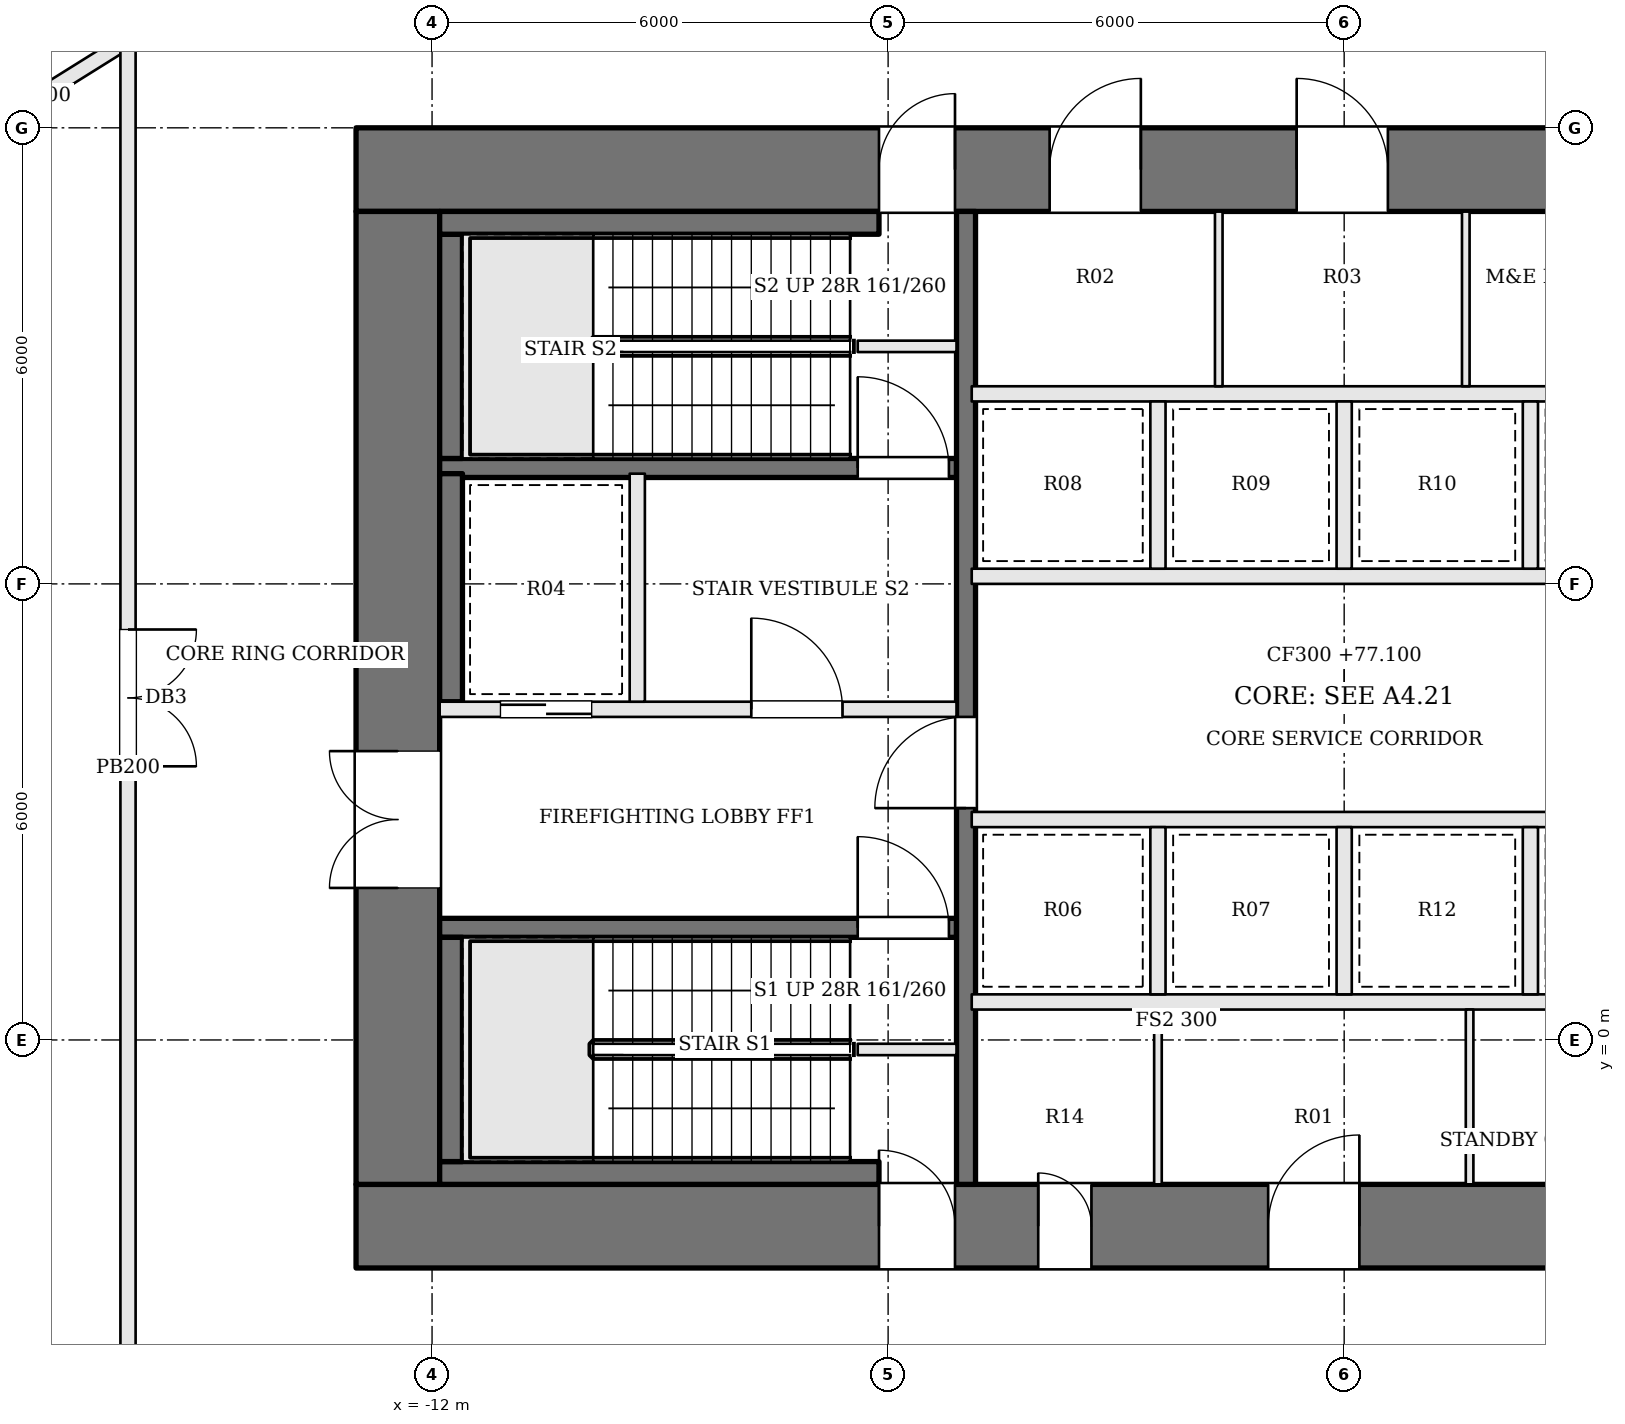
"""IFC4 building model, lengths in metres.
Left out: names, types, materials, properties, quantities, classifications, styles, units other than length and angle.
Written with IfcOpenShell. Run it as: python <this file> out.ifc"""

import sys

from ifc_helpers import new_model, si_unit, direction, frame, frame_2d, origin, place, context, subcontext, project, spatial, rectangle, extrude, element, fill, save


model = new_model("IFC4")
c1 = context("Model", 3, precision=1e-05, world=origin(), true_north=direction((0.0, 1.0)))
c2 = subcontext(c1, "Body", "Model", "MODEL_VIEW")
j1 = project(units=[si_unit("LENGTHUNIT", "METRE"), si_unit("PLANEANGLEUNIT", "RADIAN")], contexts=[c1])
p1 = place(None, origin())
s1 = spatial("IfcSite", under=j1, at=p1, CompositionType="ELEMENT")
p2 = place(p1, origin())
s2 = spatial("IfcBuilding", under=s1, at=p2, CompositionType="ELEMENT")
p3 = place(p2, frame((0.0, 0.0, 77.1)))
s3 = spatial("IfcBuildingStorey", under=s2, at=p3, CompositionType="ELEMENT", Elevation=77.1)
p4 = place(p3, frame((-13.0, 11.45, 0.0), z_axis=(0.0, 0.0, 1.0), x_axis=(1.0, 0.0, 0.0)))
e1 = element("IfcWall", 1, at=p4, inside=s3, PredefinedType="SHEAR", context=c2, shape_type="SweptSolid", body=[
    extrude(rectangle(XDim=26.0, YDim=1.1, at=frame_2d((13.0, 0.0))), origin(), (0.0, 0.0, 1.0), 4.5),
])
p5 = place(p4, frame((9.125, 0.0, 0.0)))
e2 = element("IfcOpeningElement", 2, at=p5, cuts=e1, PredefinedType="OPENING", context=c2, shape_type="SweptSolid", body=[
    extrude(rectangle(XDim=1.2, YDim=2.1, at=frame_2d((0.6, 1.05))), frame((0.0, 0.56, 0.0), z_axis=(0.0, -1.0, 0.0), x_axis=(1.0, 0.0, 0.0)), (0.0, 0.0, 1.0), 1.12),
])
p6 = place(p4, frame((12.375, 0.0, 0.0)))
e3 = element("IfcOpeningElement", 3, at=p6, cuts=e1, PredefinedType="OPENING", context=c2, shape_type="SweptSolid", body=[
    extrude(rectangle(XDim=1.2, YDim=2.1, at=frame_2d((0.6, 1.05))), frame((0.0, 0.56, 0.0), z_axis=(0.0, -1.0, 0.0), x_axis=(1.0, 0.0, 0.0)), (0.0, 0.0, 1.0), 1.12),
])
p7 = place(p4, frame((15.9, 0.0, 0.0)))
e4 = element("IfcOpeningElement", 4, at=p7, cuts=e1, PredefinedType="OPENING", context=c2, shape_type="SweptSolid", body=[
    extrude(rectangle(XDim=0.7, YDim=2.1, at=frame_2d((0.35, 1.05))), frame((0.0, 0.56, 0.0), z_axis=(0.0, -1.0, 0.0), x_axis=(1.0, 0.0, 0.0)), (0.0, 0.0, 1.0), 1.12),
])
p8 = place(p4, frame((6.88, 0.0, 0.0)))
e5 = element("IfcOpeningElement", 5, at=p8, cuts=e1, PredefinedType="OPENING", context=c2, shape_type="SweptSolid", body=[
    extrude(rectangle(XDim=1.0, YDim=2.1, at=frame_2d((0.5, 1.05))), frame((0.0, 0.56, 0.0), z_axis=(0.0, -1.0, 0.0), x_axis=(1.0, 0.0, 0.0)), (0.0, 0.0, 1.0), 1.12),
])
p9 = place(p4, frame((18.12, 0.0, 0.0)))
e6 = element("IfcOpeningElement", 6, at=p9, cuts=e1, PredefinedType="OPENING", context=c2, shape_type="SweptSolid", body=[
    extrude(rectangle(XDim=1.0, YDim=2.1, at=frame_2d((0.5, 1.05))), frame((0.0, 0.56, 0.0), z_axis=(0.0, -1.0, 0.0), x_axis=(1.0, 0.0, 0.0)), (0.0, 0.0, 1.0), 1.12),
])
p10 = place(p3, frame((-13.0, -2.45, 0.0), z_axis=(0.0, 0.0, 1.0), x_axis=(1.0, 0.0, 0.0)))
e7 = element("IfcWall", 7, at=p10, inside=s3, PredefinedType="SHEAR", context=c2, shape_type="SweptSolid", body=[
    extrude(rectangle(XDim=26.0, YDim=1.1, at=frame_2d((13.0, 0.0))), origin(), (0.0, 0.0, 1.0), 4.5),
])
p11 = place(p10, frame((8.975, 0.0, 0.0)))
e8 = element("IfcOpeningElement", 8, at=p11, cuts=e7, PredefinedType="OPENING", context=c2, shape_type="SweptSolid", body=[
    extrude(rectangle(XDim=0.7, YDim=2.1, at=frame_2d((0.35, 1.05))), frame((0.0, 0.56, 0.0), z_axis=(0.0, -1.0, 0.0), x_axis=(1.0, 0.0, 0.0)), (0.0, 0.0, 1.0), 1.12),
])
p12 = place(p10, frame((12.0, 0.0, 0.0)))
e9 = element("IfcOpeningElement", 9, at=p12, cuts=e7, PredefinedType="OPENING", context=c2, shape_type="SweptSolid", body=[
    extrude(rectangle(XDim=1.2, YDim=2.1, at=frame_2d((0.6, 1.05))), frame((0.0, 0.56, 0.0), z_axis=(0.0, -1.0, 0.0), x_axis=(1.0, 0.0, 0.0)), (0.0, 0.0, 1.0), 1.12),
])
p13 = place(p10, frame((15.675, 0.0, 0.0)))
e10 = element("IfcOpeningElement", 10, at=p13, cuts=e7, PredefinedType="OPENING", context=c2, shape_type="SweptSolid", body=[
    extrude(rectangle(XDim=1.2, YDim=2.1, at=frame_2d((0.6, 1.05))), frame((0.0, 0.56, 0.0), z_axis=(0.0, -1.0, 0.0), x_axis=(1.0, 0.0, 0.0)), (0.0, 0.0, 1.0), 1.12),
])
p14 = place(p10, frame((6.88, 0.0, 0.0)))
e11 = element("IfcOpeningElement", 11, at=p14, cuts=e7, PredefinedType="OPENING", context=c2, shape_type="SweptSolid", body=[
    extrude(rectangle(XDim=1.0, YDim=2.1, at=frame_2d((0.5, 1.05))), frame((0.0, 0.56, 0.0), z_axis=(0.0, -1.0, 0.0), x_axis=(1.0, 0.0, 0.0)), (0.0, 0.0, 1.0), 1.12),
])
p15 = place(p10, frame((18.12, 0.0, 0.0)))
e12 = element("IfcOpeningElement", 12, at=p15, cuts=e7, PredefinedType="OPENING", context=c2, shape_type="SweptSolid", body=[
    extrude(rectangle(XDim=1.0, YDim=2.1, at=frame_2d((0.5, 1.05))), frame((0.0, 0.56, 0.0), z_axis=(0.0, -1.0, 0.0), x_axis=(1.0, 0.0, 0.0)), (0.0, 0.0, 1.0), 1.12),
])
p16 = place(p3, frame((-12.45, -1.9, 0.0), z_axis=(0.0, 0.0, 1.0), x_axis=(0.0, 1.0, 0.0)))
e13 = element("IfcWall", 13, at=p16, inside=s3, PredefinedType="SHEAR", context=c2, shape_type="SweptSolid", body=[
    extrude(rectangle(XDim=12.8, YDim=1.1, at=frame_2d((6.4, 0.0))), origin(), (0.0, 0.0, 1.0), 4.5),
])
p17 = place(p16, frame((3.9, 0.0, 0.0)))
e14 = element("IfcOpeningElement", 14, at=p17, cuts=e13, PredefinedType="OPENING", context=c2, shape_type="SweptSolid", body=[
    extrude(rectangle(XDim=1.8, YDim=2.1, at=frame_2d((0.9, 1.05))), frame((0.0, 0.56, 0.0), z_axis=(0.0, -1.0, 0.0), x_axis=(1.0, 0.0, 0.0)), (0.0, 0.0, 1.0), 1.12),
])
for number, where, z_axis, x_axis in (
    (15, (-6.4, -0.125, 0.0), (0.0, 0.0, 1.0), (1.0, 0.0, 0.0)),
    (16, (-6.4, 9.125, 0.0), (0.0, 0.0, 1.0), (1.0, 0.0, 0.0)),
):
    element("IfcWall", number, at=place(p3, frame(where, z_axis=z_axis, x_axis=x_axis)), inside=s3, PredefinedType="SOLIDWALL", context=c2, shape_type="SweptSolid", body=[
        extrude(rectangle(XDim=1.3, YDim=0.15, at=frame_2d((0.65, 0.0))), origin(), (0.0, 0.0, 1.0), 4.3),
    ])
p18 = place(p3, frame((-11.9, 1.475, 0.0), z_axis=(0.0, 0.0, 1.0), x_axis=(1.0, 0.0, 0.0)))
e17 = element("IfcWall", 17, at=p18, inside=s3, PredefinedType="SOLIDWALL", context=c2, shape_type="SweptSolid", body=[
    extrude(rectangle(XDim=6.8, YDim=0.25, at=frame_2d((3.4, 0.0))), origin(), (0.0, 0.0, 1.0), 4.3),
])
p19 = place(p18, frame((5.5, 0.0, 0.0)))
e18 = element("IfcOpeningElement", 18, at=p19, cuts=e17, PredefinedType="OPENING", context=c2, shape_type="SweptSolid", body=[
    extrude(rectangle(XDim=1.2, YDim=2.1, at=frame_2d((0.6, 1.05))), frame((0.0, 0.135, 0.0), z_axis=(0.0, -1.0, 0.0), x_axis=(1.0, 0.0, 0.0)), (0.0, 0.0, 1.0), 0.27),
])
p20 = place(p3, frame((-11.9, 4.35, 0.0), z_axis=(0.0, 0.0, 1.0), x_axis=(1.0, 0.0, 0.0)))
e19 = element("IfcWall", 19, at=p20, inside=s3, PredefinedType="SOLIDWALL", context=c2, shape_type="SweptSolid", body=[
    extrude(rectangle(XDim=6.8, YDim=0.2, at=frame_2d((3.4, 0.0))), origin(), (0.0, 0.0, 1.0), 4.3),
])
p21 = place(p20, frame((4.1, 0.0, 0.0)))
e20 = element("IfcOpeningElement", 20, at=p21, cuts=e19, PredefinedType="OPENING", context=c2, shape_type="SweptSolid", body=[
    extrude(rectangle(XDim=1.2, YDim=2.1, at=frame_2d((0.6, 1.05))), frame((0.0, 0.11, 0.0), z_axis=(0.0, -1.0, 0.0), x_axis=(1.0, 0.0, 0.0)), (0.0, 0.0, 1.0), 0.22),
])
p22 = place(p20, frame((0.8, 0.0, 0.0)))
e21 = element("IfcOpeningElement", 21, at=p22, cuts=e19, PredefinedType="OPENING", context=c2, shape_type="SweptSolid", body=[
    extrude(rectangle(XDim=1.2, YDim=2.1, at=frame_2d((0.6, 1.05))), frame((0.0, 0.11, 0.0), z_axis=(0.0, -1.0, 0.0), x_axis=(1.0, 0.0, 0.0)), (0.0, 0.0, 1.0), 0.22),
])
p23 = place(p3, frame((-11.9, 7.525, 0.0), z_axis=(0.0, 0.0, 1.0), x_axis=(1.0, 0.0, 0.0)))
e22 = element("IfcWall", 22, at=p23, inside=s3, PredefinedType="SOLIDWALL", context=c2, shape_type="SweptSolid", body=[
    extrude(rectangle(XDim=6.8, YDim=0.25, at=frame_2d((3.4, 0.0))), origin(), (0.0, 0.0, 1.0), 4.3),
])
p24 = place(p23, frame((5.5, 0.0, 0.0)))
e23 = element("IfcOpeningElement", 23, at=p24, cuts=e22, PredefinedType="OPENING", context=c2, shape_type="SweptSolid", body=[
    extrude(rectangle(XDim=1.2, YDim=2.1, at=frame_2d((0.6, 1.05))), frame((0.0, 0.135, 0.0), z_axis=(0.0, -1.0, 0.0), x_axis=(1.0, 0.0, 0.0)), (0.0, 0.0, 1.0), 0.27),
])
p25 = place(p3, frame((-9.3, 4.45, 0.0), z_axis=(0.0, 0.0, 1.0), x_axis=(0.0, 1.0, 0.0)))
e24 = element("IfcWall", 24, at=p25, inside=s3, PredefinedType="SOLIDWALL", context=c2, shape_type="SweptSolid", body=[
    extrude(rectangle(XDim=3.0, YDim=0.2, at=frame_2d((1.5, 0.0))), origin(), (0.0, 0.0, 1.0), 4.3),
])
p26 = place(p3, frame((-4.975, -1.9, 0.0), z_axis=(0.0, 0.0, 1.0), x_axis=(0.0, 1.0, 0.0)))
e25 = element("IfcWall", 25, at=p26, inside=s3, PredefinedType="SOLIDWALL", context=c2, shape_type="SweptSolid", body=[
    extrude(rectangle(XDim=12.8, YDim=0.25, at=frame_2d((6.4, 0.0))), origin(), (0.0, 0.0, 1.0), 4.3),
])
p27 = place(p26, frame((4.95, 0.0, 0.0)))
e26 = element("IfcOpeningElement", 26, at=p27, cuts=e25, PredefinedType="OPENING", context=c2, shape_type="SweptSolid", body=[
    extrude(rectangle(XDim=1.2, YDim=2.1, at=frame_2d((0.6, 1.05))), frame((0.0, 0.135, 0.0), z_axis=(0.0, -1.0, 0.0), x_axis=(1.0, 0.0, 0.0)), (0.0, 0.0, 1.0), 0.27),
])
p28 = place(p3, frame((-11.9, -1.75, 0.0), z_axis=(0.0, 0.0, 1.0), x_axis=(1.0, 0.0, 0.0)))
e27 = element("IfcWall", 27, at=p28, inside=s3, PredefinedType="SOLIDWALL", context=c2, shape_type="SweptSolid", body=[
    extrude(rectangle(XDim=5.78, YDim=0.3, at=frame_2d((2.89, 0.0))), origin(), (0.0, 0.0, 1.0), 4.3),
])
p29 = place(p3, frame((-11.75, -1.6, 0.0), z_axis=(0.0, 0.0, 1.0), x_axis=(0.0, 1.0, 0.0)))
e28 = element("IfcWall", 28, at=p29, inside=s3, PredefinedType="SOLIDWALL", context=c2, shape_type="SweptSolid", body=[
    extrude(rectangle(XDim=2.95, YDim=0.3, at=frame_2d((1.475, 0.0))), origin(), (0.0, 0.0, 1.0), 4.3),
])
p30 = place(p3, frame((-11.75, 4.45, 0.0), z_axis=(0.0, 0.0, 1.0), x_axis=(0.0, 1.0, 0.0)))
e29 = element("IfcWall", 29, at=p30, inside=s3, PredefinedType="SOLIDWALL", context=c2, shape_type="SweptSolid", body=[
    extrude(rectangle(XDim=3.0, YDim=0.3, at=frame_2d((1.5, 0.0))), origin(), (0.0, 0.0, 1.0), 4.3),
])
p31 = place(p3, frame((-11.75, 7.65, 0.0), z_axis=(0.0, 0.0, 1.0), x_axis=(0.0, 1.0, 0.0)))
e30 = element("IfcWall", 30, at=p31, inside=s3, PredefinedType="SOLIDWALL", context=c2, shape_type="SweptSolid", body=[
    extrude(rectangle(XDim=2.95, YDim=0.3, at=frame_2d((1.475, 0.0))), origin(), (0.0, 0.0, 1.0), 4.3),
])
p32 = place(p3, frame((-11.9, 10.75, 0.0), z_axis=(0.0, 0.0, 1.0), x_axis=(1.0, 0.0, 0.0)))
e31 = element("IfcWall", 31, at=p32, inside=s3, PredefinedType="SOLIDWALL", context=c2, shape_type="SweptSolid", body=[
    extrude(rectangle(XDim=5.78, YDim=0.3, at=frame_2d((2.89, 0.0))), origin(), (0.0, 0.0, 1.0), 4.3),
])
for number, where, z_axis, x_axis in (
    (32, (-4.9, 0.5, 0.0), (0.0, 0.0, 1.0), (1.0, 0.0, 0.0)),
    (33, (-4.9, 2.9, 0.0), (0.0, 0.0, 1.0), (1.0, 0.0, 0.0)),
    (34, (-4.9, 6.1, 0.0), (0.0, 0.0, 1.0), (1.0, 0.0, 0.0)),
    (35, (-4.9, 8.5, 0.0), (0.0, 0.0, 1.0), (1.0, 0.0, 0.0)),
):
    element("IfcWall", number, at=place(p3, frame(where, z_axis=z_axis, x_axis=x_axis)), inside=s3, PredefinedType="SOLIDWALL", context=c2, shape_type="SweptSolid", body=[
        extrude(rectangle(XDim=9.8, YDim=0.2, at=frame_2d((4.9, 0.0))), origin(), (0.0, 0.0, 1.0), 4.3),
    ])
for number, where, z_axis, x_axis in (
    (36, (-2.45, 0.6, 0.0), (0.0, 0.0, 1.0), (0.0, 1.0, 0.0)),
    (37, (0.0, 0.6, 0.0), (0.0, 0.0, 1.0), (0.0, 1.0, 0.0)),
    (38, (2.45, 0.6, 0.0), (0.0, 0.0, 1.0), (0.0, 1.0, 0.0)),
    (39, (-2.45, 6.2, 0.0), (0.0, 0.0, 1.0), (0.0, 1.0, 0.0)),
    (40, (0.0, 6.2, 0.0), (0.0, 0.0, 1.0), (0.0, 1.0, 0.0)),
    (41, (2.45, 6.2, 0.0), (0.0, 0.0, 1.0), (0.0, 1.0, 0.0)),
):
    element("IfcWall", number, at=place(p3, frame(where, z_axis=z_axis, x_axis=x_axis)), inside=s3, PredefinedType="SOLIDWALL", context=c2, shape_type="SweptSolid", body=[
        extrude(rectangle(XDim=2.2, YDim=0.2, at=frame_2d((1.1, 0.0))), origin(), (0.0, 0.0, 1.0), 4.3),
    ])
for number, where, z_axis, x_axis in (
    (42, (-2.45, -1.9, 0.0), (0.0, 0.0, 1.0), (0.0, 1.0, 0.0)),
    (43, (1.65, -1.9, 0.0), (0.0, 0.0, 1.0), (0.0, 1.0, 0.0)),
    (44, (-1.65, 8.6, 0.0), (0.0, 0.0, 1.0), (0.0, 1.0, 0.0)),
    (45, (1.6, 8.6, 0.0), (0.0, 0.0, 1.0), (0.0, 1.0, 0.0)),
):
    element("IfcWall", number, at=place(p3, frame(where, z_axis=z_axis, x_axis=x_axis)), inside=s3, PredefinedType="PARTITIONING", context=c2, shape_type="SweptSolid", body=[
        extrude(rectangle(XDim=2.3, YDim=0.1, at=frame_2d((1.15, 0.0))), origin(), (0.0, 0.0, 1.0), 4.3),
    ])
p33 = place(p3, frame((-18.422, 11.635, 0.0), z_axis=(0.0, 0.0, 1.0), x_axis=(0.848299824463, 0.529516201656, 0.0)))
e46 = element("IfcWall", 46, at=p33, inside=s3, PredefinedType="PARTITIONING", context=c2, shape_type="SweptSolid", body=[
    extrude(rectangle(XDim=2.955, YDim=0.2, at=frame_2d((1.478, 0.0))), origin(), (0.0, 0.0, 1.0), 4.3),
])
p34 = place(p3, frame((-16.0, 13.047, 0.0), z_axis=(0.0, 0.0, 1.0), x_axis=(0.0, -1.0, 0.0)))
e47 = element("IfcWall", 47, at=p34, inside=s3, PredefinedType="PARTITIONING", context=c2, shape_type="SweptSolid", body=[
    extrude(rectangle(XDim=18.947, YDim=0.2, at=frame_2d((9.474, 0.0))), origin(), (0.0, 0.0, 1.0), 4.3),
])
p35 = place(p34, frame((7.647, 0.0, 0.0)))
e48 = element("IfcOpeningElement", 48, at=p35, cuts=e47, PredefinedType="OPENING", context=c2, shape_type="SweptSolid", body=[
    extrude(rectangle(XDim=1.8, YDim=2.1, at=frame_2d((0.9, 1.05))), frame((0.0, 0.11, 0.0), z_axis=(0.0, -1.0, 0.0), x_axis=(1.0, 0.0, 0.0)), (0.0, 0.0, 1.0), 0.22),
])
p36 = place(p17, origin())
e49 = element("IfcDoor", 49, at=p36, inside=s3, OperationType="DOUBLE_DOOR_SINGLE_SWING", PredefinedType="DOOR", context=c2, shape_type="SweptSolid", body=[
    extrude(rectangle(XDim=1.8, YDim=2.1, at=frame_2d((0.9, 1.05))), frame((0.0, 0.025, 0.0), z_axis=(0.0, -1.0, 0.0), x_axis=(1.0, 0.0, 0.0)), (0.0, 0.0, 1.0), 0.05),
])
fill(e14, e49)
p37 = place(p27, origin())
e50 = element("IfcDoor", 50, at=p37, inside=s3, OperationType="SINGLE_SWING_LEFT", PredefinedType="DOOR", context=c2, shape_type="SweptSolid", body=[
    extrude(rectangle(XDim=1.2, YDim=2.1, at=frame_2d((0.6, 1.05))), frame((0.0, 0.025, 0.0), z_axis=(0.0, -1.0, 0.0), x_axis=(1.0, 0.0, 0.0)), (0.0, 0.0, 1.0), 0.05),
])
fill(e26, e50)
p38 = place(p21, origin())
e51 = element("IfcDoor", 51, at=p38, inside=s3, OperationType="SINGLE_SWING_LEFT", PredefinedType="DOOR", context=c2, shape_type="SweptSolid", body=[
    extrude(rectangle(XDim=1.2, YDim=2.1, at=frame_2d((0.6, 1.05))), frame((0.0, 0.025, 0.0), z_axis=(0.0, -1.0, 0.0), x_axis=(1.0, 0.0, 0.0)), (0.0, 0.0, 1.0), 0.05),
])
fill(e20, e51)
p39 = place(p19, origin())
e52 = element("IfcDoor", 52, at=p39, inside=s3, OperationType="SINGLE_SWING_LEFT", PredefinedType="DOOR", context=c2, shape_type="SweptSolid", body=[
    extrude(rectangle(XDim=1.2, YDim=2.1, at=frame_2d((0.6, 1.05))), frame((0.0, 0.025, 0.0), z_axis=(0.0, -1.0, 0.0), x_axis=(1.0, 0.0, 0.0)), (0.0, 0.0, 1.0), 0.05),
])
fill(e18, e52)
p40 = place(p24, origin())
e53 = element("IfcDoor", 53, at=p40, inside=s3, OperationType="SINGLE_SWING_LEFT", PredefinedType="DOOR", context=c2, shape_type="SweptSolid", body=[
    extrude(rectangle(XDim=1.2, YDim=2.1, at=frame_2d((0.6, 1.05))), frame((0.0, 0.025, 0.0), z_axis=(0.0, -1.0, 0.0), x_axis=(1.0, 0.0, 0.0)), (0.0, 0.0, 1.0), 0.05),
])
fill(e23, e53)
p41 = place(p22, origin())
e54 = element("IfcDoor", 54, at=p41, inside=s3, OperationType="SLIDING_TO_RIGHT", PredefinedType="DOOR", context=c2, shape_type="SweptSolid", body=[
    extrude(rectangle(XDim=1.2, YDim=2.1, at=frame_2d((0.6, 1.05))), frame((0.0, 0.025, 0.0), z_axis=(0.0, -1.0, 0.0), x_axis=(1.0, 0.0, 0.0)), (0.0, 0.0, 1.0), 0.05),
])
fill(e21, e54)
p42 = place(p11, origin())
e55 = element("IfcDoor", 55, at=p42, inside=s3, OperationType="SINGLE_SWING_LEFT", PredefinedType="DOOR", context=c2, shape_type="SweptSolid", body=[
    extrude(rectangle(XDim=0.7, YDim=2.1, at=frame_2d((0.35, 1.05))), frame((0.0, 0.025, 0.0), z_axis=(0.0, -1.0, 0.0), x_axis=(1.0, 0.0, 0.0)), (0.0, 0.0, 1.0), 0.05),
])
fill(e8, e55)
p43 = place(p12, origin())
e56 = element("IfcDoor", 56, at=p43, inside=s3, OperationType="SINGLE_SWING_RIGHT", PredefinedType="DOOR", context=c2, shape_type="SweptSolid", body=[
    extrude(rectangle(XDim=1.2, YDim=2.1, at=frame_2d((0.6, 1.05))), frame((0.0, 0.025, 0.0), z_axis=(0.0, -1.0, 0.0), x_axis=(1.0, 0.0, 0.0)), (0.0, 0.0, 1.0), 0.05),
])
fill(e9, e56)
p44 = place(p5, origin())
e57 = element("IfcDoor", 57, at=p44, inside=s3, OperationType="SINGLE_SWING_RIGHT", PredefinedType="DOOR", context=c2, shape_type="SweptSolid", body=[
    extrude(rectangle(XDim=1.2, YDim=2.1, at=frame_2d((0.6, 1.05))), frame((0.0, 0.025, 0.0), z_axis=(0.0, -1.0, 0.0), x_axis=(1.0, 0.0, 0.0)), (0.0, 0.0, 1.0), 0.05),
])
fill(e2, e57)
p45 = place(p6, origin())
e58 = element("IfcDoor", 58, at=p45, inside=s3, OperationType="SINGLE_SWING_LEFT", PredefinedType="DOOR", context=c2, shape_type="SweptSolid", body=[
    extrude(rectangle(XDim=1.2, YDim=2.1, at=frame_2d((0.6, 1.05))), frame((0.0, 0.025, 0.0), z_axis=(0.0, -1.0, 0.0), x_axis=(1.0, 0.0, 0.0)), (0.0, 0.0, 1.0), 0.05),
])
fill(e3, e58)
p46 = place(p14, origin())
e59 = element("IfcDoor", 59, at=p46, inside=s3, OperationType="SINGLE_SWING_LEFT", PredefinedType="DOOR", context=c2, shape_type="SweptSolid", body=[
    extrude(rectangle(XDim=1.0, YDim=2.1, at=frame_2d((0.5, 1.05))), frame((0.0, 0.025, 0.0), z_axis=(0.0, -1.0, 0.0), x_axis=(1.0, 0.0, 0.0)), (0.0, 0.0, 1.0), 0.05),
])
fill(e11, e59)
p47 = place(p8, origin())
e60 = element("IfcDoor", 60, at=p47, inside=s3, OperationType="SINGLE_SWING_RIGHT", PredefinedType="DOOR", context=c2, shape_type="SweptSolid", body=[
    extrude(rectangle(XDim=1.0, YDim=2.1, at=frame_2d((0.5, 1.05))), frame((0.0, 0.025, 0.0), z_axis=(0.0, -1.0, 0.0), x_axis=(1.0, 0.0, 0.0)), (0.0, 0.0, 1.0), 0.05),
])
fill(e5, e60)
p48 = place(p35, origin())
e61 = element("IfcDoor", 61, at=p48, inside=s3, OperationType="DOUBLE_DOOR_SINGLE_SWING", PredefinedType="DOOR", context=c2, shape_type="SweptSolid", body=[
    extrude(rectangle(XDim=1.8, YDim=2.1, at=frame_2d((0.9, 1.05))), frame((0.0, 0.025, 0.0), z_axis=(0.0, -1.0, 0.0), x_axis=(1.0, 0.0, 0.0)), (0.0, 0.0, 1.0), 0.05),
])
fill(e48, e61)
save(model, sys.argv[1])
